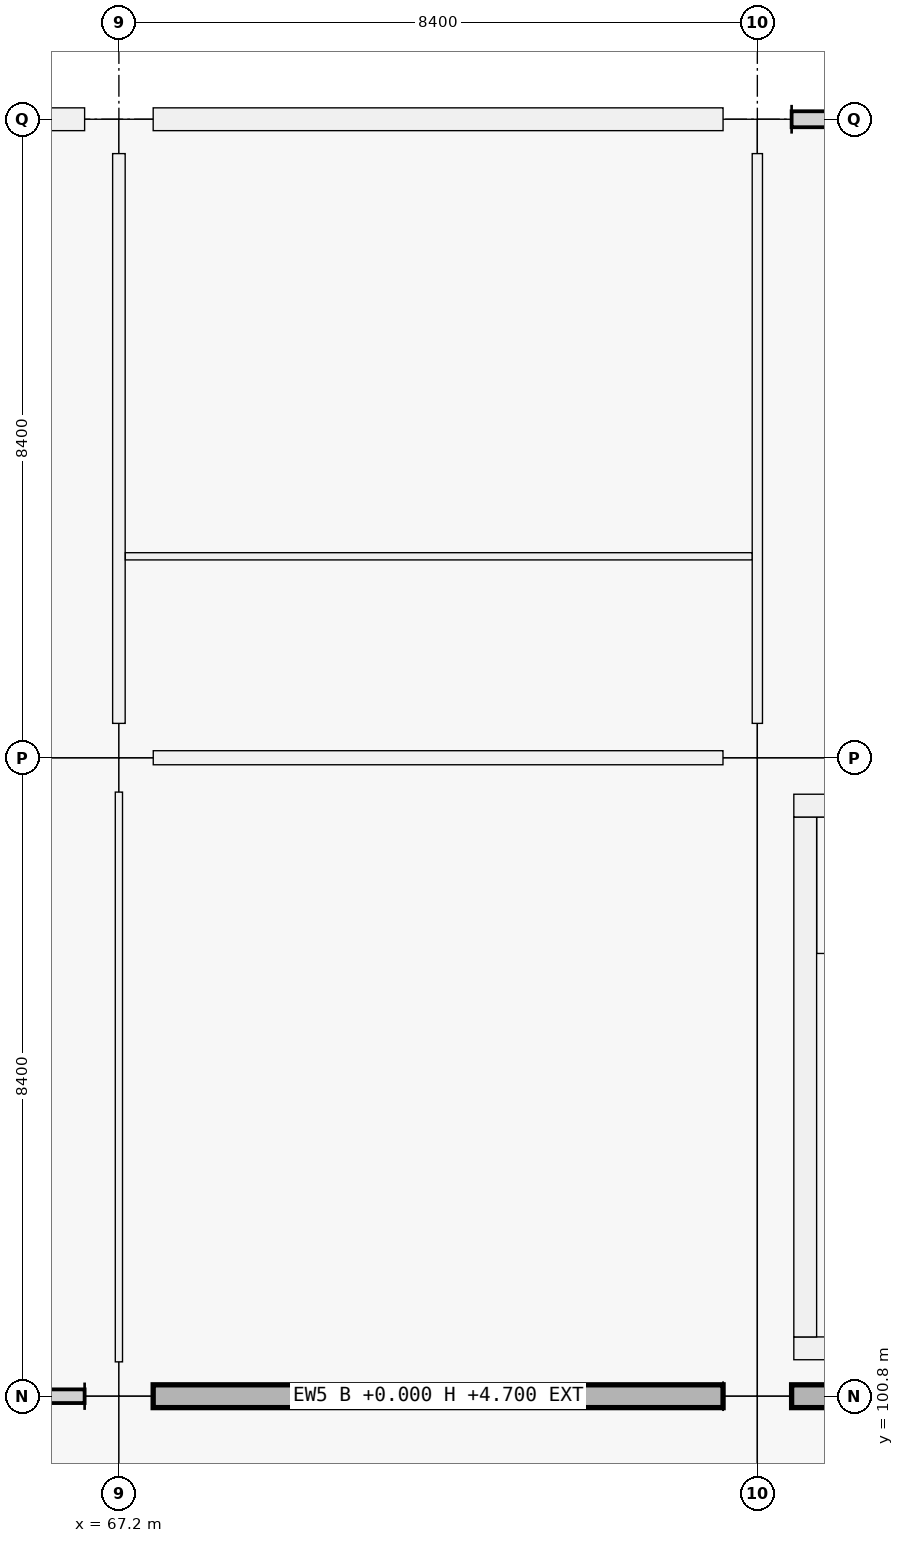
"""IFC4 building model, lengths in metres.
Left out: names, types, materials, properties, quantities, classifications, styles, units other than length and angle.
Written with IfcOpenShell. Run it as: python <this file> out.ifc"""

import sys

from ifc_helpers import new_model, si_unit, direction, frame, frame_2d, origin, origin_2d, place, context, subcontext, project, spatial, rectangle, extrude, element, fill, save


model = new_model("IFC4")
c1 = context("Model", 3, precision=1e-05, world=origin(), true_north=direction((0.0, 1.0)))
c2 = subcontext(c1, "Body", "Model", "MODEL_VIEW")
j1 = project(units=[si_unit("LENGTHUNIT", "METRE"), si_unit("PLANEANGLEUNIT", "RADIAN")], contexts=[c1])
p1 = place(None, origin())
s1 = spatial("IfcSite", under=j1, at=p1, CompositionType="ELEMENT")
p2 = place(p1, origin())
s2 = spatial("IfcBuilding", under=s1, at=p2, CompositionType="ELEMENT")
p3 = place(p2, origin())
s3 = spatial("IfcBuildingStorey", under=s2, at=p3, CompositionType="ELEMENT", Elevation=0.0)
for number, where, z_axis, x_axis in (
    (1, (67.2, 100.8, 0.0), (0.0, 0.0, 1.0), (1.0, 0.0, 0.0)),
    (2, (67.2, 109.2, 0.0), (0.0, 0.0, 1.0), (1.0, 0.0, 0.0)),
    (3, (67.2, 117.6, 0.0), (0.0, 0.0, 1.0), (1.0, 0.0, 0.0)),
    (4, (75.6, 100.8, 0.0), (0.0, 0.0, 1.0), (1.0, 0.0, 0.0)),
    (5, (75.6, 109.2, 0.0), (0.0, 0.0, 1.0), (1.0, 0.0, 0.0)),
    (6, (75.6, 117.6, 0.0), (0.0, 0.0, 1.0), (1.0, 0.0, 0.0)),
):
    element("IfcColumn", number, at=place(p3, frame(where, z_axis=z_axis, x_axis=x_axis)), inside=s3, PredefinedType="COLUMN", context=c2, shape_type="SweptSolid", body=[
        extrude(rectangle(XDim=0.9, YDim=0.9, at=origin_2d()), origin(), (0.0, 0.0, 1.0), 5.76),
    ])
p4 = place(p3, frame((59.251, 117.6, 0.0), z_axis=(0.0, 0.0, 1.0), x_axis=(1.0, 0.0, 0.0)))
e7 = element("IfcWall", 7, at=p4, inside=s3, PredefinedType="SOLIDWALL", context=c2, shape_type="SweptSolid", body=[
    extrude(rectangle(XDim=7.498, YDim=0.3, at=frame_2d((3.749, 0.0))), origin(), (0.0, 0.0, 1.0), 4.7),
])
p5 = place(p4, frame((2.599, 0.0, 0.0)))
e8 = element("IfcOpeningElement", 8, at=p5, cuts=e7, PredefinedType="OPENING", context=c2, shape_type="SweptSolid", body=[
    extrude(rectangle(XDim=2.3, YDim=2.3, at=frame_2d((1.15, 1.15))), frame((0.0, 0.15, 0.0), z_axis=(0.0, -1.0, 0.0), x_axis=(1.0, 0.0, 0.0)), (0.0, 0.0, 1.0), 0.3),
])
p6 = place(p3, frame((75.149, 100.8, 0.0), z_axis=(0.0, 0.0, 1.0), x_axis=(-1.0, 0.0, 0.0)))
e9 = element("IfcWall", 9, at=p6, inside=s3, PredefinedType="SOLIDWALL", context=c2, shape_type="SweptSolid", body=[
    extrude(rectangle(XDim=7.498, YDim=0.3, at=frame_2d((3.749, 0.0))), origin(), (0.0, 0.0, 1.0), 4.7),
])
p7 = place(p6, frame((3.199, 0.0, 0.9)))
e10 = element("IfcOpeningElement", 10, at=p7, cuts=e9, PredefinedType="OPENING", context=c2, shape_type="SweptSolid", body=[
    extrude(rectangle(XDim=1.1, YDim=1.5, at=frame_2d((0.55, 0.75))), frame((0.0, 0.15, 0.0), z_axis=(0.0, -1.0, 0.0), x_axis=(1.0, 0.0, 0.0)), (0.0, 0.0, 1.0), 0.3),
])
p8 = place(p3, frame((67.651, 117.6, 0.0), z_axis=(0.0, 0.0, 1.0), x_axis=(1.0, 0.0, 0.0)))
e11 = element("IfcWall", 11, at=p8, inside=s3, PredefinedType="SOLIDWALL", context=c2, shape_type="SweptSolid", body=[
    extrude(rectangle(XDim=7.498, YDim=0.3, at=frame_2d((3.749, 0.0))), origin(), (0.0, 0.0, 1.0), 4.7),
])
p9 = place(p8, frame((2.999, 0.0, 0.9)))
e12 = element("IfcOpeningElement", 12, at=p9, cuts=e11, PredefinedType="OPENING", context=c2, shape_type="SweptSolid", body=[
    extrude(rectangle(XDim=1.5, YDim=1.2, at=frame_2d((0.75, 0.6))), frame((0.0, 0.15, 0.0), z_axis=(0.0, -1.0, 0.0), x_axis=(1.0, 0.0, 0.0)), (0.0, 0.0, 1.0), 0.3),
])
p10 = place(p3, frame((83.549, 100.8, 0.0), z_axis=(0.0, 0.0, 1.0), x_axis=(-1.0, 0.0, 0.0)))
e13 = element("IfcWall", 13, at=p10, inside=s3, PredefinedType="SOLIDWALL", context=c2, shape_type="SweptSolid", body=[
    extrude(rectangle(XDim=7.498, YDim=0.3, at=frame_2d((3.749, 0.0))), origin(), (0.0, 0.0, 1.0), 4.7),
])
p11 = place(p3, frame((83.52, 101.43, 0.0), z_axis=(0.0, 0.0, 1.0), x_axis=(-1.0, 0.0, 0.0)))
e14 = element("IfcWall", 14, at=p11, inside=s3, PredefinedType="SHEAR", context=c2, shape_type="SweptSolid", body=[
    extrude(rectangle(XDim=7.44, YDim=0.3, at=frame_2d((3.72, 0.0))), origin(), (0.0, 0.0, 1.0), 5.76),
])
p12 = place(p3, frame((76.23, 101.58, 0.0), z_axis=(0.0, 0.0, 1.0), x_axis=(0.0, 1.0, 0.0)))
e15 = element("IfcWall", 15, at=p12, inside=s3, PredefinedType="SHEAR", context=c2, shape_type="SweptSolid", body=[
    extrude(rectangle(XDim=6.84, YDim=0.3, at=frame_2d((3.42, 0.0))), origin(), (0.0, 0.0, 1.0), 5.76),
])
p13 = place(p3, frame((76.08, 108.57, 0.0), z_axis=(0.0, 0.0, 1.0), x_axis=(1.0, 0.0, 0.0)))
e16 = element("IfcWall", 16, at=p13, inside=s3, PredefinedType="SHEAR", context=c2, shape_type="SweptSolid", body=[
    extrude(rectangle(XDim=7.44, YDim=0.3, at=frame_2d((3.72, 0.0))), origin(), (0.0, 0.0, 1.0), 5.76),
])
p14 = place(p3, frame((67.652, 109.2, 0.0), z_axis=(0.0, 0.0, 1.0), x_axis=(1.0, 0.0, 0.0)))
e17 = element("IfcWall", 17, at=p14, inside=s3, PredefinedType="PARTITIONING", context=c2, shape_type="SweptSolid", body=[
    extrude(rectangle(XDim=7.496, YDim=0.185, at=frame_2d((3.748, 0.0))), origin(), (0.0, 0.0, 1.0), 3.66),
])
p15 = place(p3, frame((67.2, 101.252, 0.0), z_axis=(0.0, 0.0, 1.0), x_axis=(0.0, 1.0, 0.0)))
e18 = element("IfcWall", 18, at=p15, inside=s3, PredefinedType="PARTITIONING", context=c2, shape_type="SweptSolid", body=[
    extrude(rectangle(XDim=7.496, YDim=0.095, at=frame_2d((3.748, 0.0))), origin(), (0.0, 0.0, 1.0), 3.66),
])
p16 = place(p15, frame((3.238, 0.0, 0.0)))
e19 = element("IfcOpeningElement", 19, at=p16, cuts=e18, PredefinedType="OPENING", context=c2, shape_type="SweptSolid", body=[
    extrude(rectangle(XDim=1.02, YDim=2.2, at=frame_2d((0.51, 1.1))), frame((0.0, 0.047, 0.0), z_axis=(0.0, -1.0, 0.0), x_axis=(1.0, 0.0, 0.0)), (0.0, 0.0, 1.0), 0.095),
])
p17 = place(p3, frame((67.2, 109.652, 0.0), z_axis=(0.0, 0.0, 1.0), x_axis=(0.0, 1.0, 0.0)))
e20 = element("IfcWall", 20, at=p17, inside=s3, PredefinedType="PARTITIONING", context=c2, shape_type="SweptSolid", body=[
    extrude(rectangle(XDim=7.496, YDim=0.165, at=frame_2d((3.748, 0.0))), origin(), (0.0, 0.0, 1.0), 3.66),
])
p18 = place(p17, frame((0.553, 0.0, 0.0)))
e21 = element("IfcOpeningElement", 21, at=p18, cuts=e20, PredefinedType="OPENING", context=c2, shape_type="SweptSolid", body=[
    extrude(rectangle(XDim=0.92, YDim=2.1, at=frame_2d((0.46, 1.05))), frame((0.0, 0.083, 0.0), z_axis=(0.0, -1.0, 0.0), x_axis=(1.0, 0.0, 0.0)), (0.0, 0.0, 1.0), 0.165),
])
p19 = place(p17, frame((4.443, 0.0, 0.0)))
e22 = element("IfcOpeningElement", 22, at=p19, cuts=e20, PredefinedType="OPENING", context=c2, shape_type="SweptSolid", body=[
    extrude(rectangle(XDim=0.98, YDim=2.08, at=frame_2d((0.49, 1.04))), frame((0.0, 0.083, 0.0), z_axis=(0.0, -1.0, 0.0), x_axis=(1.0, 0.0, 0.0)), (0.0, 0.0, 1.0), 0.165),
])
p20 = place(p3, frame((75.6, 109.652, 0.0), z_axis=(0.0, 0.0, 1.0), x_axis=(0.0, 1.0, 0.0)))
e23 = element("IfcWall", 23, at=p20, inside=s3, PredefinedType="PARTITIONING", context=c2, shape_type="SweptSolid", body=[
    extrude(rectangle(XDim=7.496, YDim=0.135, at=frame_2d((3.748, 0.0))), origin(), (0.0, 0.0, 1.0), 3.66),
])
p21 = place(p3, frame((67.284, 111.85, 0.0), z_axis=(0.0, 0.0, 1.0), x_axis=(1.0, 0.0, 0.0)))
e24 = element("IfcWall", 24, at=p21, inside=s3, PredefinedType="PARTITIONING", context=c2, shape_type="SweptSolid", body=[
    extrude(rectangle(XDim=8.246, YDim=0.095, at=frame_2d((4.123, 0.0))), origin(), (0.0, 0.0, 1.0), 3.66),
])
p22 = place(p7, origin())
e25 = element("IfcWindow", 25, at=p22, inside=s3, PartitioningType="SINGLE_PANEL", PredefinedType="WINDOW", context=c2, shape_type="SweptSolid", body=[
    extrude(rectangle(XDim=1.1, YDim=1.5, at=frame_2d((0.55, 0.75))), frame((0.0, 0.03, 0.0), z_axis=(0.0, -1.0, 0.0), x_axis=(1.0, 0.0, 0.0)), (0.0, 0.0, 1.0), 0.06),
])
fill(e10, e25)
p23 = place(p9, origin())
e26 = element("IfcWindow", 26, at=p23, inside=s3, PartitioningType="SINGLE_PANEL", PredefinedType="WINDOW", context=c2, shape_type="SweptSolid", body=[
    extrude(rectangle(XDim=1.5, YDim=1.2, at=frame_2d((0.75, 0.6))), frame((0.0, 0.03, 0.0), z_axis=(0.0, -1.0, 0.0), x_axis=(1.0, 0.0, 0.0)), (0.0, 0.0, 1.0), 0.06),
])
fill(e12, e26)
p24 = place(p18, origin())
e27 = element("IfcDoor", 27, at=p24, inside=s3, OperationType="SINGLE_SWING_LEFT", PredefinedType="DOOR", context=c2, shape_type="SweptSolid", body=[
    extrude(rectangle(XDim=0.92, YDim=2.1, at=frame_2d((0.46, 1.05))), frame((0.0, 0.025, 0.0), z_axis=(0.0, -1.0, 0.0), x_axis=(1.0, 0.0, 0.0)), (0.0, 0.0, 1.0), 0.05),
])
fill(e21, e27)
p25 = place(p19, origin())
e28 = element("IfcDoor", 28, at=p25, inside=s3, OperationType="SINGLE_SWING_RIGHT", PredefinedType="DOOR", context=c2, shape_type="SweptSolid", body=[
    extrude(rectangle(XDim=0.98, YDim=2.08, at=frame_2d((0.49, 1.04))), frame((0.0, 0.025, 0.0), z_axis=(0.0, -1.0, 0.0), x_axis=(1.0, 0.0, 0.0)), (0.0, 0.0, 1.0), 0.05),
])
fill(e22, e28)
p26 = place(p16, origin())
e29 = element("IfcDoor", 29, at=p26, inside=s3, OperationType="SINGLE_SWING_LEFT", PredefinedType="DOOR", context=c2, shape_type="SweptSolid", body=[
    extrude(rectangle(XDim=1.02, YDim=2.2, at=frame_2d((0.51, 1.1))), frame((0.0, 0.025, 0.0), z_axis=(0.0, -1.0, 0.0), x_axis=(1.0, 0.0, 0.0)), (0.0, 0.0, 1.0), 0.05),
])
fill(e19, e29)
save(model, sys.argv[1])
